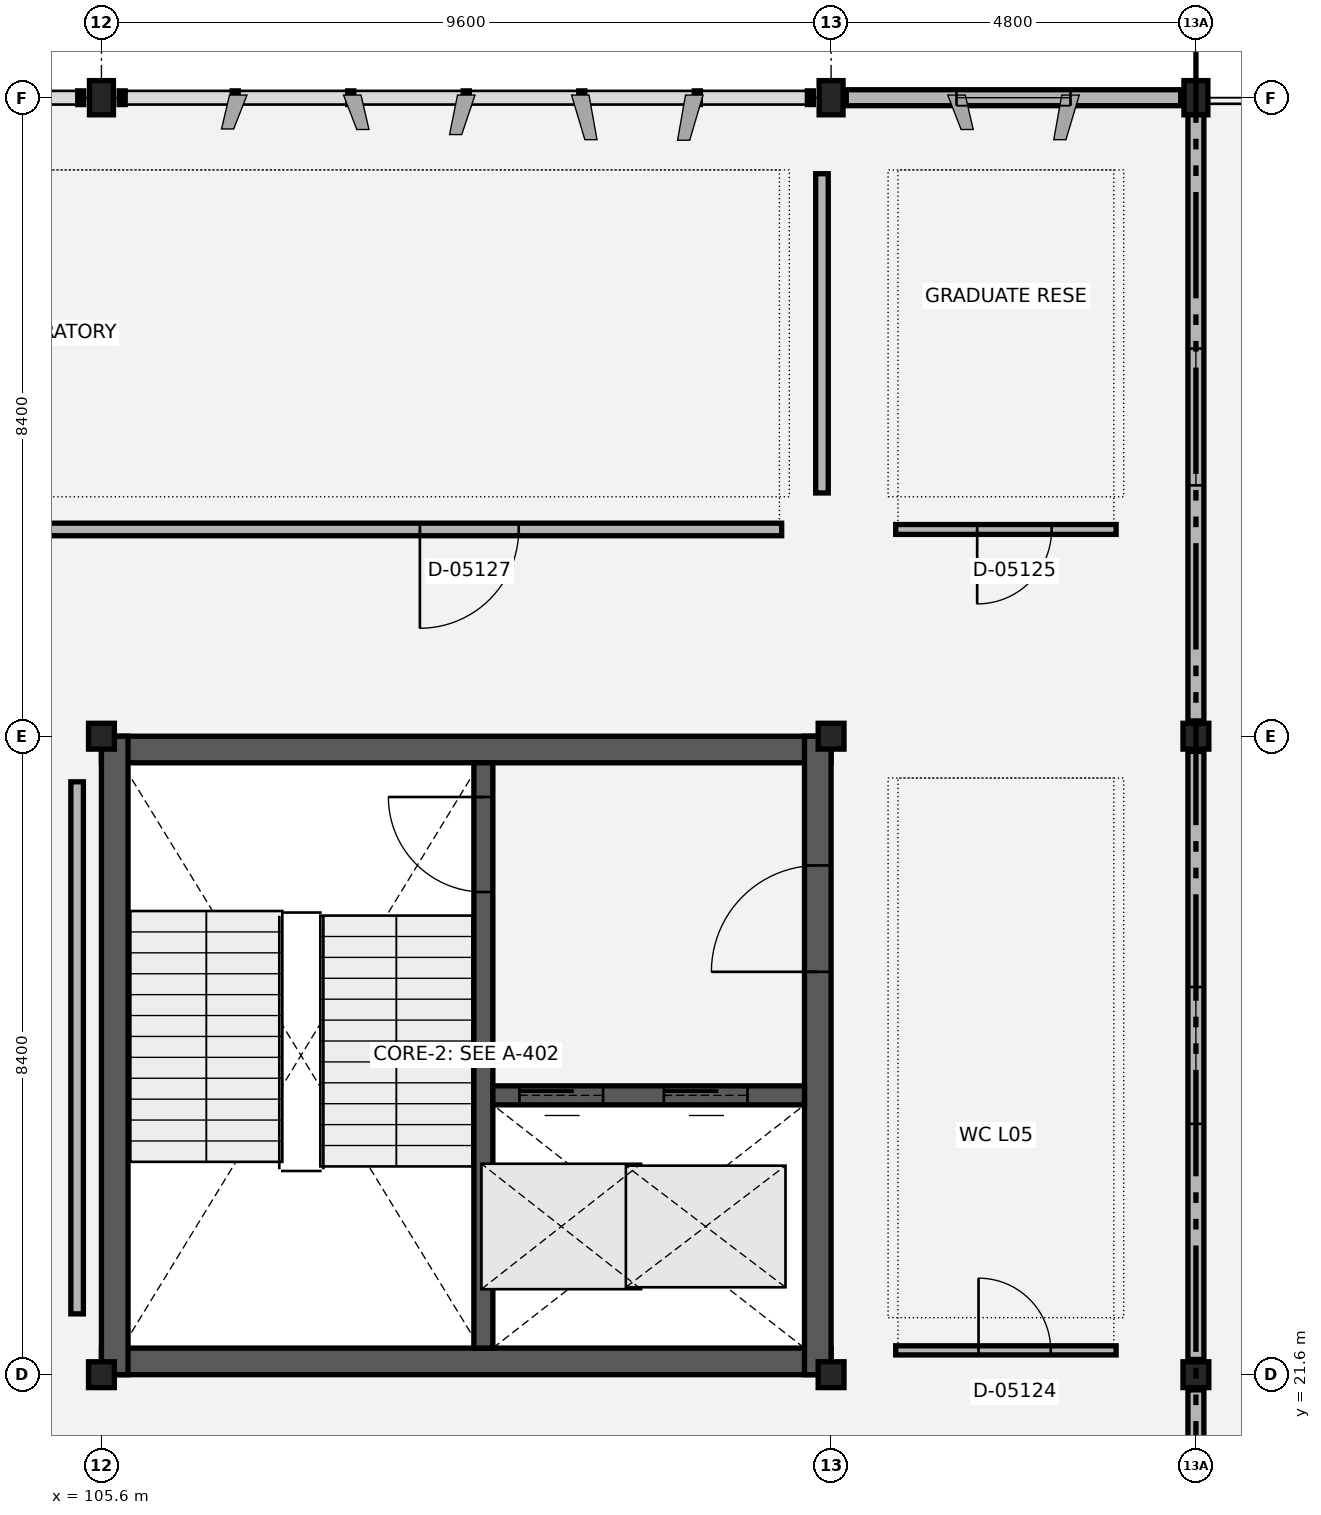
"""IFC4 building model, lengths in metres.
Left out: names, types, materials, properties, quantities, classifications, styles, units other than length and angle.
Written with IfcOpenShell. Run it as: python <this file> out.ifc"""

import sys

from ifc_helpers import new_model, si_unit, direction, frame, frame_2d, origin, origin_2d, place, context, subcontext, project, spatial, rectangle, extrude, element, fill, save


model = new_model("IFC4")
c1 = context("Model", 3, precision=1e-05, world=origin(), true_north=direction((0.0, 1.0)))
c2 = subcontext(c1, "Body", "Model", "MODEL_VIEW")
j1 = project(units=[si_unit("LENGTHUNIT", "METRE"), si_unit("PLANEANGLEUNIT", "RADIAN")], contexts=[c1])
p1 = place(None, origin())
s1 = spatial("IfcSite", under=j1, at=p1, CompositionType="ELEMENT")
p2 = place(p1, origin())
s2 = spatial("IfcBuilding", under=s1, at=p2, CompositionType="ELEMENT")
p3 = place(p2, frame((0.0, 0.0, 22.8)))
s3 = spatial("IfcBuildingStorey", under=s2, at=p3, CompositionType="ELEMENT", Elevation=22.8)
for number, where, z_axis, x_axis in (
    (1, (105.6, 21.6, 0.0), (0.0, 0.0, 1.0), (1.0, 0.0, 0.0)),
    (2, (105.6, 30.0, 0.0), (0.0, 0.0, 1.0), (1.0, 0.0, 0.0)),
):
    element("IfcColumn", number, at=place(p3, frame(where, z_axis=z_axis, x_axis=x_axis)), inside=s3, PredefinedType="COLUMN", context=c2, shape_type="SweptSolid", body=[
        extrude(rectangle(XDim=0.34, YDim=0.34, at=origin_2d()), origin(), (0.0, 0.0, 1.0), 4.2),
    ])
p4 = place(p3, frame((105.6, 38.4, 0.0), z_axis=(0.0, 0.0, 1.0), x_axis=(1.0, 0.0, 0.0)))
e3 = element("IfcColumn", 3, at=p4, inside=s3, PredefinedType="COLUMN", context=c2, shape_type="SweptSolid", body=[
    extrude(rectangle(XDim=0.315, YDim=0.45, at=origin_2d()), origin(), (0.0, 0.0, 1.0), 4.2),
])
for number, where, z_axis, x_axis in (
    (4, (115.2, 21.6, 0.0), (0.0, 0.0, 1.0), (1.0, 0.0, 0.0)),
    (5, (115.2, 30.0, 0.0), (0.0, 0.0, 1.0), (1.0, 0.0, 0.0)),
):
    element("IfcColumn", number, at=place(p3, frame(where, z_axis=z_axis, x_axis=x_axis)), inside=s3, PredefinedType="COLUMN", context=c2, shape_type="SweptSolid", body=[
        extrude(rectangle(XDim=0.34, YDim=0.34, at=origin_2d()), origin(), (0.0, 0.0, 1.0), 4.2),
    ])
p5 = place(p3, frame((115.2, 38.4, 0.0), z_axis=(0.0, 0.0, 1.0), x_axis=(1.0, 0.0, 0.0)))
e6 = element("IfcColumn", 6, at=p5, inside=s3, PredefinedType="COLUMN", context=c2, shape_type="SweptSolid", body=[
    extrude(rectangle(XDim=0.315, YDim=0.45, at=origin_2d()), origin(), (0.0, 0.0, 1.0), 4.2),
])
for number, where, z_axis, x_axis in (
    (7, (120.0, 21.6, 0.0), (0.0, 0.0, 1.0), (1.0, 0.0, 0.0)),
    (8, (120.0, 30.0, 0.0), (0.0, 0.0, 1.0), (1.0, 0.0, 0.0)),
):
    element("IfcColumn", number, at=place(p3, frame(where, z_axis=z_axis, x_axis=x_axis)), inside=s3, PredefinedType="COLUMN", context=c2, shape_type="SweptSolid", body=[
        extrude(rectangle(XDim=0.34, YDim=0.34, at=origin_2d()), origin(), (0.0, 0.0, 1.0), 4.2),
    ])
p6 = place(p3, frame((120.0, 38.4, 0.0), z_axis=(0.0, 0.0, 1.0), x_axis=(1.0, 0.0, 0.0)))
e9 = element("IfcColumn", 9, at=p6, inside=s3, PredefinedType="COLUMN", context=c2, shape_type="SweptSolid", body=[
    extrude(rectangle(XDim=0.315, YDim=0.45, at=origin_2d()), origin(), (0.0, 0.0, 1.0), 4.2),
])
p7 = place(p3, frame((119.8, 38.4, 0.0), z_axis=(0.0, 0.0, 1.0), x_axis=(-1.0, 0.0, 0.0)))
e10 = element("IfcWall", 10, at=p7, inside=s3, PredefinedType="SOLIDWALL", context=c2, shape_type="SweptSolid", body=[
    extrude(rectangle(XDim=4.4, YDim=0.21, at=frame_2d((2.2, 0.0))), origin(), (0.0, 0.0, 1.0), 3.07),
])
p8 = place(p7, frame((1.45, 0.0, 0.9)))
e11 = element("IfcOpeningElement", 11, at=p8, cuts=e10, PredefinedType="OPENING", context=c2, shape_type="SweptSolid", body=[
    extrude(rectangle(XDim=1.5, YDim=1.5, at=frame_2d((0.75, 0.75))), frame((0.0, 0.115, 0.0), z_axis=(0.0, -1.0, 0.0), x_axis=(1.0, 0.0, 0.0)), (0.0, 0.0, 1.0), 0.23),
])
p9 = place(p3, frame((120.0, 13.4, 0.0), z_axis=(0.0, 0.0, 1.0), x_axis=(0.0, 1.0, 0.0)))
e12 = element("IfcWall", 12, at=p9, inside=s3, PredefinedType="SOLIDWALL", context=c2, shape_type="SweptSolid", body=[
    extrude(rectangle(XDim=8.0, YDim=0.21, at=frame_2d((4.0, 0.0))), origin(), (0.0, 0.0, 1.0), 3.07),
])
p10 = place(p9, frame((3.4, 0.0, 0.0)))
e13 = element("IfcOpeningElement", 13, at=p10, cuts=e12, PredefinedType="OPENING", context=c2, shape_type="SweptSolid", body=[
    extrude(rectangle(XDim=1.2, YDim=2.15, at=frame_2d((0.6, 1.075))), frame((0.0, 0.115, 0.0), z_axis=(0.0, -1.0, 0.0), x_axis=(1.0, 0.0, 0.0)), (0.0, 0.0, 1.0), 0.23),
])
p11 = place(p3, frame((120.0, 21.8, 0.0), z_axis=(0.0, 0.0, 1.0), x_axis=(0.0, 1.0, 0.0)))
e14 = element("IfcWall", 14, at=p11, inside=s3, PredefinedType="SOLIDWALL", context=c2, shape_type="SweptSolid", body=[
    extrude(rectangle(XDim=8.0, YDim=0.21, at=frame_2d((4.0, 0.0))), origin(), (0.0, 0.0, 1.0), 3.07),
])
p12 = place(p11, frame((3.1, 0.0, 0.9)))
e15 = element("IfcOpeningElement", 15, at=p12, cuts=e14, PredefinedType="OPENING", context=c2, shape_type="SweptSolid", body=[
    extrude(rectangle(XDim=1.8, YDim=1.5, at=frame_2d((0.9, 0.75))), frame((0.0, 0.115, 0.0), z_axis=(0.0, -1.0, 0.0), x_axis=(1.0, 0.0, 0.0)), (0.0, 0.0, 1.0), 0.23),
])
p13 = place(p3, frame((120.0, 30.2, 0.0), z_axis=(0.0, 0.0, 1.0), x_axis=(0.0, 1.0, 0.0)))
e16 = element("IfcWall", 16, at=p13, inside=s3, PredefinedType="SOLIDWALL", context=c2, shape_type="SweptSolid", body=[
    extrude(rectangle(XDim=8.0, YDim=0.21, at=frame_2d((4.0, 0.0))), origin(), (0.0, 0.0, 1.0), 3.07),
])
p14 = place(p13, frame((3.1, 0.0, 0.9)))
e17 = element("IfcOpeningElement", 17, at=p14, cuts=e16, PredefinedType="OPENING", context=c2, shape_type="SweptSolid", body=[
    extrude(rectangle(XDim=1.8, YDim=1.5, at=frame_2d((0.9, 0.75))), frame((0.0, 0.115, 0.0), z_axis=(0.0, -1.0, 0.0), x_axis=(1.0, 0.0, 0.0)), (0.0, 0.0, 1.0), 0.23),
])
for number, where, z_axis, x_axis in (
    (18, (105.6, 29.825, 0.0), (0.0, 0.0, 1.0), (1.0, 0.0, 0.0)),
    (19, (105.6, 21.775, 0.0), (0.0, 0.0, 1.0), (1.0, 0.0, 0.0)),
):
    element("IfcWall", number, at=place(p3, frame(where, z_axis=z_axis, x_axis=x_axis)), inside=s3, PredefinedType="SHEAR", context=c2, shape_type="SweptSolid", body=[
        extrude(rectangle(XDim=9.6, YDim=0.35, at=frame_2d((4.8, 0.0))), origin(), (0.0, 0.0, 1.0), 3.97),
    ])
p15 = place(p3, frame((105.775, 21.6, 0.0), z_axis=(0.0, 0.0, 1.0), x_axis=(0.0, 1.0, 0.0)))
e20 = element("IfcWall", 20, at=p15, inside=s3, PredefinedType="SHEAR", context=c2, shape_type="SweptSolid", body=[
    extrude(rectangle(XDim=8.4, YDim=0.35, at=frame_2d((4.2, 0.0))), origin(), (0.0, 0.0, 1.0), 3.97),
])
p16 = place(p3, frame((115.025, 21.6, 0.0), z_axis=(0.0, 0.0, 1.0), x_axis=(0.0, 1.0, 0.0)))
e21 = element("IfcWall", 21, at=p16, inside=s3, PredefinedType="SHEAR", context=c2, shape_type="SweptSolid", body=[
    extrude(rectangle(XDim=8.4, YDim=0.35, at=frame_2d((4.2, 0.0))), origin(), (0.0, 0.0, 1.0), 3.97),
])
p17 = place(p16, frame((5.3, 0.0, 0.0)))
e22 = element("IfcOpeningElement", 22, at=p17, cuts=e21, PredefinedType="OPENING", context=c2, shape_type="SweptSolid", body=[
    extrude(rectangle(XDim=1.4, YDim=2.15, at=frame_2d((0.7, 1.075))), frame((0.0, 0.185, 0.0), z_axis=(0.0, -1.0, 0.0), x_axis=(1.0, 0.0, 0.0)), (0.0, 0.0, 1.0), 0.37),
])
p18 = place(p3, frame((110.625, 29.65, 0.0), z_axis=(0.0, 0.0, 1.0), x_axis=(0.0, -1.0, 0.0)))
e23 = element("IfcWall", 23, at=p18, inside=s3, PredefinedType="SHEAR", context=c2, shape_type="SweptSolid", body=[
    extrude(rectangle(XDim=7.7, YDim=0.25, at=frame_2d((3.85, 0.0))), origin(), (0.0, 0.0, 1.0), 3.97),
])
p19 = place(p18, frame((0.45, 0.0, 0.0)))
e24 = element("IfcOpeningElement", 24, at=p19, cuts=e23, PredefinedType="OPENING", context=c2, shape_type="SweptSolid", body=[
    extrude(rectangle(XDim=1.25, YDim=2.15, at=frame_2d((0.625, 1.075))), frame((0.0, 0.135, 0.0), z_axis=(0.0, -1.0, 0.0), x_axis=(1.0, 0.0, 0.0)), (0.0, 0.0, 1.0), 0.27),
])
p20 = place(p3, frame((110.75, 25.275, 0.0), z_axis=(0.0, 0.0, 1.0), x_axis=(1.0, 0.0, 0.0)))
e25 = element("IfcWall", 25, at=p20, inside=s3, PredefinedType="SHEAR", context=c2, shape_type="SweptSolid", body=[
    extrude(rectangle(XDim=4.1, YDim=0.25, at=frame_2d((2.05, 0.0))), origin(), (0.0, 0.0, 1.0), 3.97),
])
p21 = place(p20, frame((0.35, 0.0, 0.0)))
e26 = element("IfcOpeningElement", 26, at=p21, cuts=e25, PredefinedType="OPENING", context=c2, shape_type="SweptSolid", body=[
    extrude(rectangle(XDim=1.1, YDim=2.15, at=frame_2d((0.55, 1.075))), frame((0.0, 0.135, 0.0), z_axis=(0.0, -1.0, 0.0), x_axis=(1.0, 0.0, 0.0)), (0.0, 0.0, 1.0), 0.27),
])
p22 = place(p20, frame((2.25, 0.0, 0.0)))
e27 = element("IfcOpeningElement", 27, at=p22, cuts=e25, PredefinedType="OPENING", context=c2, shape_type="SweptSolid", body=[
    extrude(rectangle(XDim=1.1, YDim=2.15, at=frame_2d((0.55, 1.075))), frame((0.0, 0.135, 0.0), z_axis=(0.0, -1.0, 0.0), x_axis=(1.0, 0.0, 0.0)), (0.0, 0.0, 1.0), 0.27),
])
p23 = place(p3, frame((105.28, 22.4, 0.0), z_axis=(0.0, 0.0, 1.0), x_axis=(0.0, 1.0, 0.0)))
e28 = element("IfcWall", 28, at=p23, inside=s3, PredefinedType="PARTITIONING", context=c2, shape_type="SweptSolid", body=[
    extrude(rectangle(XDim=7.0, YDim=0.165, at=frame_2d((3.5, 0.0))), origin(), (0.0, 0.0, 1.0), 3.05),
])
p24 = place(p3, frame((116.05, 21.92, 0.0), z_axis=(0.0, 0.0, 1.0), x_axis=(1.0, 0.0, 0.0)))
e29 = element("IfcWall", 29, at=p24, inside=s3, PredefinedType="PARTITIONING", context=c2, shape_type="SweptSolid", body=[
    extrude(rectangle(XDim=2.9, YDim=0.12, at=frame_2d((1.45, 0.0))), origin(), (0.0, 0.0, 1.0), 3.05),
])
p25 = place(p24, frame((1.09, 0.0, 0.0)))
e30 = element("IfcOpeningElement", 30, at=p25, cuts=e29, PredefinedType="OPENING", context=c2, shape_type="SweptSolid", body=[
    extrude(rectangle(XDim=0.95, YDim=2.1, at=frame_2d((0.475, 1.05))), frame((0.0, 0.07, 0.0), z_axis=(0.0, -1.0, 0.0), x_axis=(1.0, 0.0, 0.0)), (0.0, 0.0, 1.0), 0.14),
])
p26 = place(p3, frame((116.05, 32.72, 0.0), z_axis=(0.0, 0.0, 1.0), x_axis=(1.0, 0.0, 0.0)))
e31 = element("IfcWall", 31, at=p26, inside=s3, PredefinedType="PARTITIONING", context=c2, shape_type="SweptSolid", body=[
    extrude(rectangle(XDim=2.9, YDim=0.13, at=frame_2d((1.45, 0.0))), origin(), (0.0, 0.0, 1.0), 3.05),
])
p27 = place(p26, frame((1.072, 0.0, 0.0)))
e32 = element("IfcOpeningElement", 32, at=p27, cuts=e31, PredefinedType="OPENING", context=c2, shape_type="SweptSolid", body=[
    extrude(rectangle(XDim=0.98, YDim=2.1, at=frame_2d((0.49, 1.05))), frame((0.0, 0.075, 0.0), z_axis=(0.0, -1.0, 0.0), x_axis=(1.0, 0.0, 0.0)), (0.0, 0.0, 1.0), 0.15),
])
p28 = place(p3, frame((92.05, 32.72, 0.0), z_axis=(0.0, 0.0, 1.0), x_axis=(1.0, 0.0, 0.0)))
e33 = element("IfcWall", 33, at=p28, inside=s3, PredefinedType="PARTITIONING", context=c2, shape_type="SweptSolid", body=[
    extrude(rectangle(XDim=22.5, YDim=0.165, at=frame_2d((11.25, 0.0))), origin(), (0.0, 0.0, 1.0), 3.05),
])
p29 = place(p28, frame((17.74, 0.0, 0.0)))
e34 = element("IfcOpeningElement", 34, at=p29, cuts=e33, PredefinedType="OPENING", context=c2, shape_type="SweptSolid", body=[
    extrude(rectangle(XDim=1.3, YDim=2.15, at=frame_2d((0.65, 1.075))), frame((0.0, 0.093, 0.0), z_axis=(0.0, -1.0, 0.0), x_axis=(1.0, 0.0, 0.0)), (0.0, 0.0, 1.0), 0.185),
])
p30 = place(p3, frame((115.08, 33.2, 0.0), z_axis=(0.0, 0.0, 1.0), x_axis=(0.0, 1.0, 0.0)))
e35 = element("IfcWall", 35, at=p30, inside=s3, PredefinedType="PARTITIONING", context=c2, shape_type="SweptSolid", body=[
    extrude(rectangle(XDim=4.2, YDim=0.165, at=frame_2d((2.1, 0.0))), origin(), (0.0, 0.0, 1.0), 3.05),
])
p31 = place(p8, origin())
e36 = element("IfcWindow", 36, at=p31, inside=s3, PartitioningType="SINGLE_PANEL", PredefinedType="WINDOW", context=c2, shape_type="SweptSolid", body=[
    extrude(rectangle(XDim=1.5, YDim=1.5, at=frame_2d((0.75, 0.75))), frame((0.0, 0.03, 0.0), z_axis=(0.0, -1.0, 0.0), x_axis=(1.0, 0.0, 0.0)), (0.0, 0.0, 1.0), 0.06),
])
fill(e11, e36)
p32 = place(p12, origin())
e37 = element("IfcWindow", 37, at=p32, inside=s3, PartitioningType="SINGLE_PANEL", PredefinedType="WINDOW", context=c2, shape_type="SweptSolid", body=[
    extrude(rectangle(XDim=1.8, YDim=1.5, at=frame_2d((0.9, 0.75))), frame((0.0, 0.03, 0.0), z_axis=(0.0, -1.0, 0.0), x_axis=(1.0, 0.0, 0.0)), (0.0, 0.0, 1.0), 0.06),
])
fill(e15, e37)
p33 = place(p14, origin())
e38 = element("IfcWindow", 38, at=p33, inside=s3, PartitioningType="SINGLE_PANEL", PredefinedType="WINDOW", context=c2, shape_type="SweptSolid", body=[
    extrude(rectangle(XDim=1.8, YDim=1.5, at=frame_2d((0.9, 0.75))), frame((0.0, 0.03, 0.0), z_axis=(0.0, -1.0, 0.0), x_axis=(1.0, 0.0, 0.0)), (0.0, 0.0, 1.0), 0.06),
])
fill(e17, e38)
p34 = place(p19, origin())
e39 = element("IfcDoor", 39, at=p34, inside=s3, OperationType="SINGLE_SWING_RIGHT", PredefinedType="DOOR", context=c2, shape_type="SweptSolid", body=[
    extrude(rectangle(XDim=1.25, YDim=2.15, at=frame_2d((0.625, 1.075))), frame((0.0, 0.025, 0.0), z_axis=(0.0, -1.0, 0.0), x_axis=(1.0, 0.0, 0.0)), (0.0, 0.0, 1.0), 0.05),
])
fill(e24, e39)
p35 = place(p21, origin())
e40 = element("IfcDoor", 40, at=p35, inside=s3, OperationType="SLIDING_TO_LEFT", PredefinedType="DOOR", context=c2, shape_type="SweptSolid", body=[
    extrude(rectangle(XDim=1.1, YDim=2.15, at=frame_2d((0.55, 1.075))), frame((0.0, 0.025, 0.0), z_axis=(0.0, -1.0, 0.0), x_axis=(1.0, 0.0, 0.0)), (0.0, 0.0, 1.0), 0.05),
])
fill(e26, e40)
p36 = place(p22, origin())
e41 = element("IfcDoor", 41, at=p36, inside=s3, OperationType="SLIDING_TO_LEFT", PredefinedType="DOOR", context=c2, shape_type="SweptSolid", body=[
    extrude(rectangle(XDim=1.1, YDim=2.15, at=frame_2d((0.55, 1.075))), frame((0.0, 0.025, 0.0), z_axis=(0.0, -1.0, 0.0), x_axis=(1.0, 0.0, 0.0)), (0.0, 0.0, 1.0), 0.05),
])
fill(e27, e41)
p37 = place(p17, origin())
e42 = element("IfcDoor", 42, at=p37, inside=s3, OperationType="SINGLE_SWING_LEFT", PredefinedType="DOOR", context=c2, shape_type="SweptSolid", body=[
    extrude(rectangle(XDim=1.4, YDim=2.15, at=frame_2d((0.7, 1.075))), frame((0.0, 0.025, 0.0), z_axis=(0.0, -1.0, 0.0), x_axis=(1.0, 0.0, 0.0)), (0.0, 0.0, 1.0), 0.05),
])
fill(e22, e42)
p38 = place(p25, origin())
e43 = element("IfcDoor", 43, at=p38, inside=s3, OperationType="SINGLE_SWING_LEFT", PredefinedType="DOOR", context=c2, shape_type="SweptSolid", body=[
    extrude(rectangle(XDim=0.95, YDim=2.1, at=frame_2d((0.475, 1.05))), frame((0.0, 0.025, 0.0), z_axis=(0.0, -1.0, 0.0), x_axis=(1.0, 0.0, 0.0)), (0.0, 0.0, 1.0), 0.05),
])
fill(e30, e43)
p39 = place(p27, origin())
e44 = element("IfcDoor", 44, at=p39, inside=s3, OperationType="SINGLE_SWING_RIGHT", PredefinedType="DOOR", context=c2, shape_type="SweptSolid", body=[
    extrude(rectangle(XDim=0.98, YDim=2.1, at=frame_2d((0.49, 1.05))), frame((0.0, 0.025, 0.0), z_axis=(0.0, -1.0, 0.0), x_axis=(1.0, 0.0, 0.0)), (0.0, 0.0, 1.0), 0.05),
])
fill(e32, e44)
p40 = place(p29, origin())
e45 = element("IfcDoor", 45, at=p40, inside=s3, OperationType="SINGLE_SWING_RIGHT", PredefinedType="DOOR", context=c2, shape_type="SweptSolid", body=[
    extrude(rectangle(XDim=1.3, YDim=2.15, at=frame_2d((0.65, 1.075))), frame((0.0, 0.025, 0.0), z_axis=(0.0, -1.0, 0.0), x_axis=(1.0, 0.0, 0.0)), (0.0, 0.0, 1.0), 0.05),
])
fill(e34, e45)
save(model, sys.argv[1])
